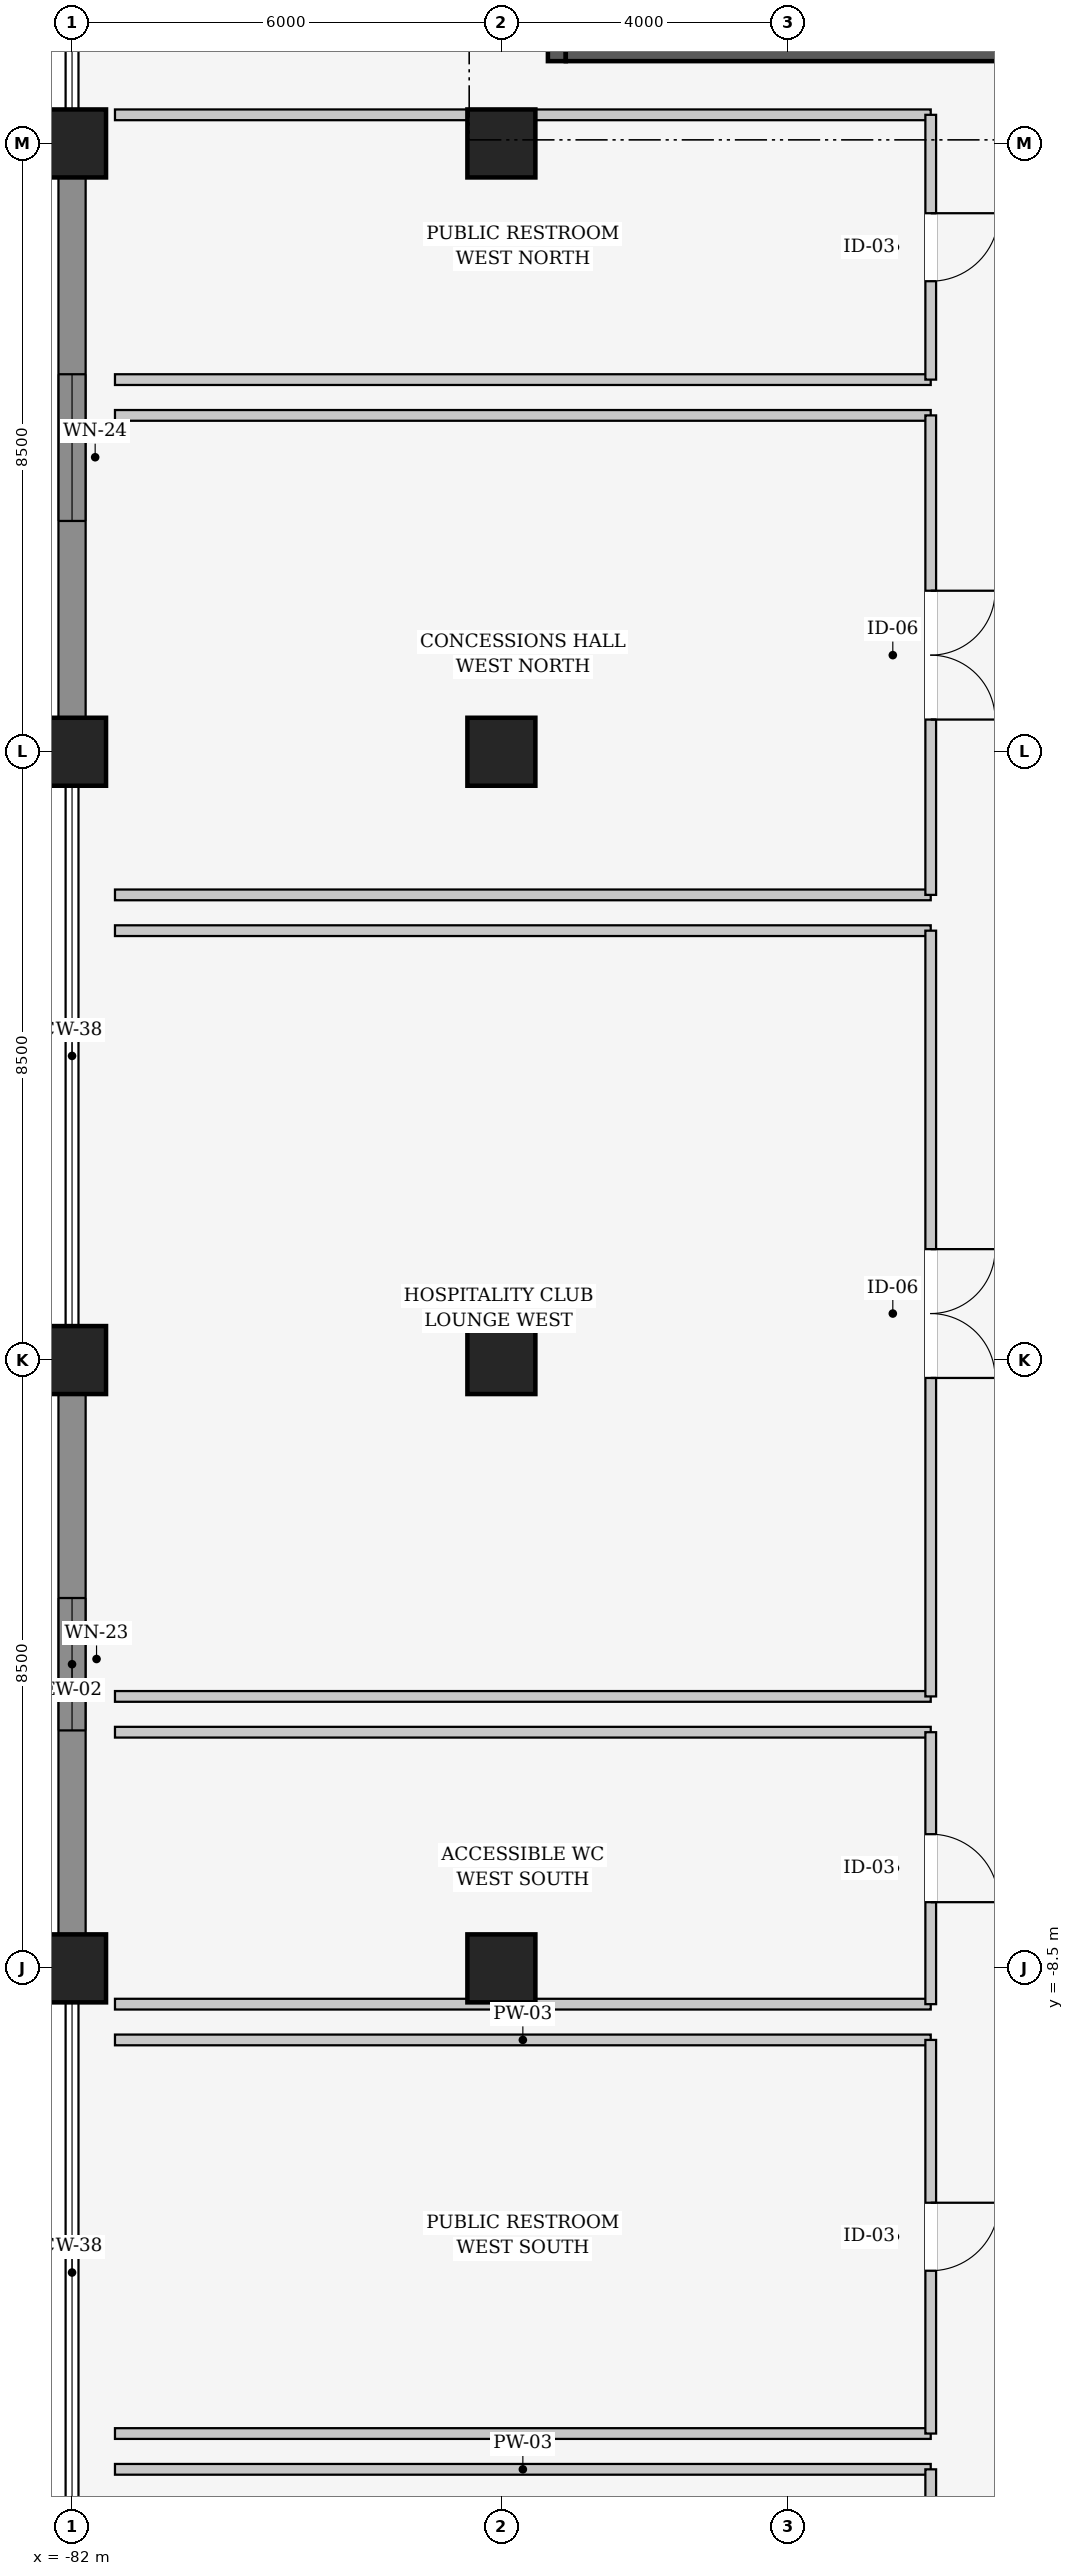
"""IFC4 building model, lengths in metres.
Left out: names, types, materials, properties, quantities, classifications, styles, units other than length and angle.
Written with IfcOpenShell. Run it as: python <this file> out.ifc"""

import sys

from ifc_helpers import new_model, si_unit, direction, frame, frame_2d, origin, origin_2d, place, context, subcontext, project, spatial, rectangle, extrude, element, fill, save


model = new_model("IFC4")
c1 = context("Model", 3, precision=1e-05, world=origin(), true_north=direction((0.0, 1.0)))
c2 = subcontext(c1, "Body", "Model", "MODEL_VIEW")
j1 = project(units=[si_unit("LENGTHUNIT", "METRE"), si_unit("PLANEANGLEUNIT", "RADIAN")], contexts=[c1])
p1 = place(None, origin())
s1 = spatial("IfcSite", under=j1, at=p1, CompositionType="ELEMENT")
p2 = place(p1, origin())
s2 = spatial("IfcBuilding", under=s1, at=p2, CompositionType="ELEMENT")
p3 = place(p2, frame((0.0, 0.0, 6.0)))
s3 = spatial("IfcBuildingStorey", under=s2, at=p3, CompositionType="ELEMENT", Elevation=6.0)
for number, where, z_axis, x_axis in (
    (1, (-82.0, -8.5, 0.0), (0.0, 0.0, 1.0), (1.0, 0.0, 0.0)),
    (2, (-82.0, 0.0, 0.0), (0.0, 0.0, 1.0), (1.0, 0.0, 0.0)),
    (3, (-82.0, 8.5, 0.0), (0.0, 0.0, 1.0), (1.0, 0.0, 0.0)),
    (4, (-82.0, 17.0, 0.0), (0.0, 0.0, 1.0), (1.0, 0.0, 0.0)),
    (5, (-76.0, -8.5, 0.0), (0.0, 0.0, 1.0), (1.0, 0.0, 0.0)),
    (6, (-76.0, 0.0, 0.0), (0.0, 0.0, 1.0), (1.0, 0.0, 0.0)),
    (7, (-76.0, 8.5, 0.0), (0.0, 0.0, 1.0), (1.0, 0.0, 0.0)),
    (8, (-76.0, 17.0, 0.0), (0.0, 0.0, 1.0), (1.0, 0.0, 0.0)),
):
    element("IfcColumn", number, at=place(p3, frame(where, z_axis=z_axis, x_axis=x_axis)), inside=s3, PredefinedType="COLUMN", context=c2, shape_type="SweptSolid", body=[
        extrude(rectangle(XDim=0.95, YDim=0.95, at=origin_2d()), origin(), (0.0, 0.0, 1.0), 5.4),
    ])
p4 = place(p3, frame((-82.0, -8.043, 0.0), z_axis=(0.0, 0.0, 1.0), x_axis=(0.0, 1.0, 0.0)))
e9 = element("IfcWall", 9, at=p4, inside=s3, PredefinedType="SOLIDWALL", context=c2, shape_type="SweptSolid", body=[
    extrude(rectangle(XDim=7.586, YDim=0.38, at=frame_2d((3.793, 0.0))), origin(), (0.0, 0.0, 1.0), 4.46),
])
p5 = place(p4, frame((2.868, 0.0, 0.9)))
e10 = element("IfcOpeningElement", 10, at=p5, cuts=e9, PredefinedType="OPENING", context=c2, shape_type="SweptSolid", body=[
    extrude(rectangle(XDim=1.85, YDim=1.75, at=frame_2d((0.925, 0.875))), frame((0.0, 0.2, 0.0), z_axis=(0.0, -1.0, 0.0), x_axis=(1.0, 0.0, 0.0)), (0.0, 0.0, 1.0), 0.4),
])
p6 = place(p3, frame((-82.0, 8.957, 0.0), z_axis=(0.0, 0.0, 1.0), x_axis=(0.0, 1.0, 0.0)))
e11 = element("IfcWall", 11, at=p6, inside=s3, PredefinedType="SOLIDWALL", context=c2, shape_type="SweptSolid", body=[
    extrude(rectangle(XDim=7.586, YDim=0.38, at=frame_2d((3.793, 0.0))), origin(), (0.0, 0.0, 1.0), 4.46),
])
p7 = place(p6, frame((2.768, 0.0, 0.9)))
e12 = element("IfcOpeningElement", 12, at=p7, cuts=e11, PredefinedType="OPENING", context=c2, shape_type="SweptSolid", body=[
    extrude(rectangle(XDim=2.05, YDim=1.75, at=frame_2d((1.025, 0.875))), frame((0.0, 0.2, 0.0), z_axis=(0.0, -1.0, 0.0), x_axis=(1.0, 0.0, 0.0)), (0.0, 0.0, 1.0), 0.4),
])
p8 = place(p3, frame((-75.225, 18.15, 0.0), z_axis=(0.0, 0.0, 1.0), x_axis=(0.0, 1.0, 0.0)))
e13 = element("IfcWall", 13, at=p8, inside=s3, PredefinedType="SHEAR", context=c2, shape_type="SweptSolid", body=[
    extrude(rectangle(XDim=5.7, YDim=0.25, at=frame_2d((2.85, 0.0))), origin(), (0.0, 0.0, 1.0), 5.4),
])
p9 = place(p3, frame((-64.9, 18.275, 0.0), z_axis=(0.0, 0.0, 1.0), x_axis=(-1.0, 0.0, 0.0)))
e14 = element("IfcWall", 14, at=p9, inside=s3, PredefinedType="SHEAR", context=c2, shape_type="SweptSolid", body=[
    extrude(rectangle(XDim=10.2, YDim=0.25, at=frame_2d((5.1, 0.0))), origin(), (0.0, 0.0, 1.0), 5.4),
])
p10 = place(p3, frame((-81.4, -15.5, 0.0), z_axis=(0.0, 0.0, 1.0), x_axis=(1.0, 0.0, 0.0)))
e15 = element("IfcWall", 15, at=p10, inside=s3, PredefinedType="PARTITIONING", context=c2, shape_type="SweptSolid", body=[
    extrude(rectangle(XDim=11.4, YDim=0.15, at=frame_2d((5.7, 0.0))), origin(), (0.0, 0.0, 1.0), 4.445),
])
p11 = place(p3, frame((-70.0, -15.5, 0.0), z_axis=(0.0, 0.0, 1.0), x_axis=(0.0, -1.0, 0.0)))
e16 = element("IfcWall", 16, at=p11, inside=s3, PredefinedType="PARTITIONING", context=c2, shape_type="SweptSolid", body=[
    extrude(rectangle(XDim=8.9, YDim=0.15, at=frame_2d((4.45, 0.0))), origin(), (0.0, 0.0, 1.0), 4.145),
])
p12 = place(p11, frame((3.55, 0.0, 0.0)))
e17 = element("IfcOpeningElement", 17, at=p12, cuts=e16, PredefinedType="OPENING", context=c2, shape_type="SweptSolid", body=[
    extrude(rectangle(XDim=1.8, YDim=2.2, at=frame_2d((0.9, 1.1))), frame((0.0, 0.085, 0.0), z_axis=(0.0, -1.0, 0.0), x_axis=(1.0, 0.0, 0.0)), (0.0, 0.0, 1.0), 0.17),
])
for number, where, z_axis, x_axis in (
    (18, (-81.4, -9.5, 0.0), (0.0, 0.0, 1.0), (1.0, 0.0, 0.0)),
    (19, (-70.0, -15.0, 0.0), (0.0, 0.0, 1.0), (-1.0, 0.0, 0.0)),
):
    element("IfcWall", number, at=place(p3, frame(where, z_axis=z_axis, x_axis=x_axis)), inside=s3, PredefinedType="PARTITIONING", context=c2, shape_type="SweptSolid", body=[
        extrude(rectangle(XDim=11.4, YDim=0.15, at=frame_2d((5.7, 0.0))), origin(), (0.0, 0.0, 1.0), 4.445),
    ])
p13 = place(p3, frame((-70.0, -9.5, 0.0), z_axis=(0.0, 0.0, 1.0), x_axis=(0.0, -1.0, 0.0)))
e20 = element("IfcWall", 20, at=p13, inside=s3, PredefinedType="PARTITIONING", context=c2, shape_type="SweptSolid", body=[
    extrude(rectangle(XDim=5.5, YDim=0.15, at=frame_2d((2.75, 0.0))), origin(), (0.0, 0.0, 1.0), 4.74),
])
p14 = place(p13, frame((2.275, 0.0, 0.0)))
e21 = element("IfcOpeningElement", 21, at=p14, cuts=e20, PredefinedType="OPENING", context=c2, shape_type="SweptSolid", body=[
    extrude(rectangle(XDim=0.95, YDim=2.15, at=frame_2d((0.475, 1.075))), frame((0.0, 0.085, 0.0), z_axis=(0.0, -1.0, 0.0), x_axis=(1.0, 0.0, 0.0)), (0.0, 0.0, 1.0), 0.17),
])
p15 = place(p3, frame((-81.4, -5.2, 0.0), z_axis=(0.0, 0.0, 1.0), x_axis=(1.0, 0.0, 0.0)))
e22 = element("IfcWall", 22, at=p15, inside=s3, PredefinedType="PARTITIONING", context=c2, shape_type="SweptSolid", body=[
    extrude(rectangle(XDim=11.4, YDim=0.15, at=frame_2d((5.7, 0.0))), origin(), (0.0, 0.0, 1.0), 4.445),
])
p16 = place(p3, frame((-70.0, -9.0, 0.0), z_axis=(0.0, 0.0, 1.0), x_axis=(-1.0, 0.0, 0.0)))
e23 = element("IfcWall", 23, at=p16, inside=s3, PredefinedType="PARTITIONING", context=c2, shape_type="SweptSolid", body=[
    extrude(rectangle(XDim=11.4, YDim=0.15, at=frame_2d((5.7, 0.0))), origin(), (0.0, 0.0, 1.0), 4.145),
])
p17 = place(p3, frame((-70.0, -5.2, 0.0), z_axis=(0.0, 0.0, 1.0), x_axis=(0.0, -1.0, 0.0)))
e24 = element("IfcWall", 24, at=p17, inside=s3, PredefinedType="PARTITIONING", context=c2, shape_type="SweptSolid", body=[
    extrude(rectangle(XDim=3.8, YDim=0.15, at=frame_2d((1.9, 0.0))), origin(), (0.0, 0.0, 1.0), 4.145),
])
p18 = place(p17, frame((1.425, 0.0, 0.0)))
e25 = element("IfcOpeningElement", 25, at=p18, cuts=e24, PredefinedType="OPENING", context=c2, shape_type="SweptSolid", body=[
    extrude(rectangle(XDim=0.95, YDim=2.15, at=frame_2d((0.475, 1.075))), frame((0.0, 0.085, 0.0), z_axis=(0.0, -1.0, 0.0), x_axis=(1.0, 0.0, 0.0)), (0.0, 0.0, 1.0), 0.17),
])
for number, where, z_axis, x_axis in (
    (26, (-81.4, 6.0, 0.0), (0.0, 0.0, 1.0), (1.0, 0.0, 0.0)),
    (27, (-70.0, -4.7, 0.0), (0.0, 0.0, 1.0), (-1.0, 0.0, 0.0)),
):
    element("IfcWall", number, at=place(p3, frame(where, z_axis=z_axis, x_axis=x_axis)), inside=s3, PredefinedType="PARTITIONING", context=c2, shape_type="SweptSolid", body=[
        extrude(rectangle(XDim=11.4, YDim=0.15, at=frame_2d((5.7, 0.0))), origin(), (0.0, 0.0, 1.0), 4.445),
    ])
p19 = place(p3, frame((-70.0, 6.0, 0.0), z_axis=(0.0, 0.0, 1.0), x_axis=(0.0, -1.0, 0.0)))
e28 = element("IfcWall", 28, at=p19, inside=s3, PredefinedType="PARTITIONING", context=c2, shape_type="SweptSolid", body=[
    extrude(rectangle(XDim=10.7, YDim=0.15, at=frame_2d((5.35, 0.0))), origin(), (0.0, 0.0, 1.0), 4.145),
])
p20 = place(p19, frame((4.45, 0.0, 0.0)))
e29 = element("IfcOpeningElement", 29, at=p20, cuts=e28, PredefinedType="OPENING", context=c2, shape_type="SweptSolid", body=[
    extrude(rectangle(XDim=1.8, YDim=2.2, at=frame_2d((0.9, 1.1))), frame((0.0, 0.085, 0.0), z_axis=(0.0, -1.0, 0.0), x_axis=(1.0, 0.0, 0.0)), (0.0, 0.0, 1.0), 0.17),
])
for number, where, z_axis, x_axis in (
    (30, (-81.4, 13.2, 0.0), (0.0, 0.0, 1.0), (1.0, 0.0, 0.0)),
    (31, (-70.0, 6.5, 0.0), (0.0, 0.0, 1.0), (-1.0, 0.0, 0.0)),
):
    element("IfcWall", number, at=place(p3, frame(where, z_axis=z_axis, x_axis=x_axis)), inside=s3, PredefinedType="PARTITIONING", context=c2, shape_type="SweptSolid", body=[
        extrude(rectangle(XDim=11.4, YDim=0.15, at=frame_2d((5.7, 0.0))), origin(), (0.0, 0.0, 1.0), 4.445),
    ])
p21 = place(p3, frame((-70.0, 13.2, 0.0), z_axis=(0.0, 0.0, 1.0), x_axis=(0.0, -1.0, 0.0)))
e32 = element("IfcWall", 32, at=p21, inside=s3, PredefinedType="PARTITIONING", context=c2, shape_type="SweptSolid", body=[
    extrude(rectangle(XDim=6.7, YDim=0.15, at=frame_2d((3.35, 0.0))), origin(), (0.0, 0.0, 1.0), 4.145),
])
p22 = place(p21, frame((2.45, 0.0, 0.0)))
e33 = element("IfcOpeningElement", 33, at=p22, cuts=e32, PredefinedType="OPENING", context=c2, shape_type="SweptSolid", body=[
    extrude(rectangle(XDim=1.8, YDim=2.2, at=frame_2d((0.9, 1.1))), frame((0.0, 0.085, 0.0), z_axis=(0.0, -1.0, 0.0), x_axis=(1.0, 0.0, 0.0)), (0.0, 0.0, 1.0), 0.17),
])
p23 = place(p3, frame((-81.4, 17.4, 0.0), z_axis=(0.0, 0.0, 1.0), x_axis=(1.0, 0.0, 0.0)))
e34 = element("IfcWall", 34, at=p23, inside=s3, PredefinedType="PARTITIONING", context=c2, shape_type="SweptSolid", body=[
    extrude(rectangle(XDim=11.4, YDim=0.15, at=frame_2d((5.7, 0.0))), origin(), (0.0, 0.0, 1.0), 4.145),
])
p24 = place(p3, frame((-70.0, 13.7, 0.0), z_axis=(0.0, 0.0, 1.0), x_axis=(-1.0, 0.0, 0.0)))
e35 = element("IfcWall", 35, at=p24, inside=s3, PredefinedType="PARTITIONING", context=c2, shape_type="SweptSolid", body=[
    extrude(rectangle(XDim=11.4, YDim=0.15, at=frame_2d((5.7, 0.0))), origin(), (0.0, 0.0, 1.0), 4.445),
])
p25 = place(p3, frame((-70.0, 17.4, 0.0), z_axis=(0.0, 0.0, 1.0), x_axis=(0.0, -1.0, 0.0)))
e36 = element("IfcWall", 36, at=p25, inside=s3, PredefinedType="PARTITIONING", context=c2, shape_type="SweptSolid", body=[
    extrude(rectangle(XDim=3.7, YDim=0.15, at=frame_2d((1.85, 0.0))), origin(), (0.0, 0.0, 1.0), 4.145),
])
p26 = place(p25, frame((1.375, 0.0, 0.0)))
e37 = element("IfcOpeningElement", 37, at=p26, cuts=e36, PredefinedType="OPENING", context=c2, shape_type="SweptSolid", body=[
    extrude(rectangle(XDim=0.95, YDim=2.15, at=frame_2d((0.475, 1.075))), frame((0.0, 0.085, 0.0), z_axis=(0.0, -1.0, 0.0), x_axis=(1.0, 0.0, 0.0)), (0.0, 0.0, 1.0), 0.17),
])
p27 = place(p5, origin())
e38 = element("IfcWindow", 38, at=p27, inside=s3, PartitioningType="SINGLE_PANEL", PredefinedType="WINDOW", context=c2, shape_type="SweptSolid", body=[
    extrude(rectangle(XDim=1.85, YDim=1.75, at=frame_2d((0.925, 0.875))), frame((0.0, 0.03, 0.0), z_axis=(0.0, -1.0, 0.0), x_axis=(1.0, 0.0, 0.0)), (0.0, 0.0, 1.0), 0.06),
])
fill(e10, e38)
p28 = place(p7, origin())
e39 = element("IfcWindow", 39, at=p28, inside=s3, PartitioningType="SINGLE_PANEL", PredefinedType="WINDOW", context=c2, shape_type="SweptSolid", body=[
    extrude(rectangle(XDim=2.05, YDim=1.75, at=frame_2d((1.025, 0.875))), frame((0.0, 0.03, 0.0), z_axis=(0.0, -1.0, 0.0), x_axis=(1.0, 0.0, 0.0)), (0.0, 0.0, 1.0), 0.06),
])
fill(e12, e39)
p29 = place(p14, origin())
e40 = element("IfcDoor", 40, at=p29, inside=s3, OperationType="SINGLE_SWING_LEFT", PredefinedType="DOOR", context=c2, shape_type="SweptSolid", body=[
    extrude(rectangle(XDim=0.95, YDim=2.15, at=frame_2d((0.475, 1.075))), frame((0.0, 0.025, 0.0), z_axis=(0.0, -1.0, 0.0), x_axis=(1.0, 0.0, 0.0)), (0.0, 0.0, 1.0), 0.05),
])
fill(e21, e40)
p30 = place(p18, origin())
e41 = element("IfcDoor", 41, at=p30, inside=s3, OperationType="SINGLE_SWING_RIGHT", PredefinedType="DOOR", context=c2, shape_type="SweptSolid", body=[
    extrude(rectangle(XDim=0.95, YDim=2.15, at=frame_2d((0.475, 1.075))), frame((0.0, 0.025, 0.0), z_axis=(0.0, -1.0, 0.0), x_axis=(1.0, 0.0, 0.0)), (0.0, 0.0, 1.0), 0.05),
])
fill(e25, e41)
p31 = place(p20, origin())
e42 = element("IfcDoor", 42, at=p31, inside=s3, OperationType="DOUBLE_DOOR_SINGLE_SWING", PredefinedType="DOOR", context=c2, shape_type="SweptSolid", body=[
    extrude(rectangle(XDim=1.8, YDim=2.2, at=frame_2d((0.9, 1.1))), frame((0.0, 0.025, 0.0), z_axis=(0.0, -1.0, 0.0), x_axis=(1.0, 0.0, 0.0)), (0.0, 0.0, 1.0), 0.05),
])
fill(e29, e42)
p32 = place(p22, origin())
e43 = element("IfcDoor", 43, at=p32, inside=s3, OperationType="DOUBLE_DOOR_SINGLE_SWING", PredefinedType="DOOR", context=c2, shape_type="SweptSolid", body=[
    extrude(rectangle(XDim=1.8, YDim=2.2, at=frame_2d((0.9, 1.1))), frame((0.0, 0.025, 0.0), z_axis=(0.0, -1.0, 0.0), x_axis=(1.0, 0.0, 0.0)), (0.0, 0.0, 1.0), 0.05),
])
fill(e33, e43)
p33 = place(p26, origin())
e44 = element("IfcDoor", 44, at=p33, inside=s3, OperationType="SINGLE_SWING_LEFT", PredefinedType="DOOR", context=c2, shape_type="SweptSolid", body=[
    extrude(rectangle(XDim=0.95, YDim=2.15, at=frame_2d((0.475, 1.075))), frame((0.0, 0.025, 0.0), z_axis=(0.0, -1.0, 0.0), x_axis=(1.0, 0.0, 0.0)), (0.0, 0.0, 1.0), 0.05),
])
fill(e37, e44)
save(model, sys.argv[1])
